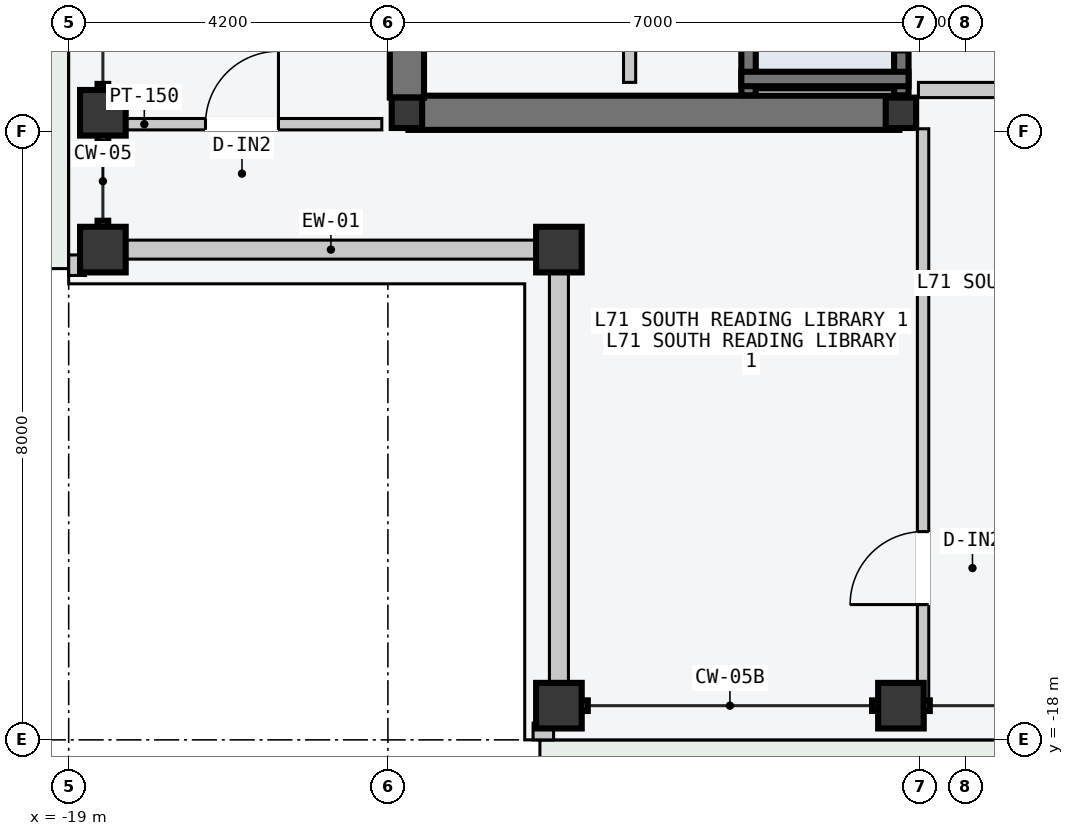
"""IFC4 building model, lengths in metres.
Left out: names, types, materials, properties, quantities, classifications, styles, units other than length and angle.
Written with IfcOpenShell. Run it as: python <this file> out.ifc"""

import sys

from ifc_helpers import new_model, si_unit, direction, frame, frame_2d, origin, origin_2d, place, context, subcontext, project, spatial, rectangle, hollow_rectangle, i_section, extrude, element, fill, save


model = new_model("IFC4")
c1 = context("Model", 3, precision=1e-05, world=origin(), true_north=direction((0.0, 1.0)))
c2 = subcontext(c1, "Body", "Model", "MODEL_VIEW")
j1 = project(units=[si_unit("LENGTHUNIT", "METRE"), si_unit("PLANEANGLEUNIT", "RADIAN")], contexts=[c1])
p1 = place(None, origin())
s1 = spatial("IfcSite", under=j1, at=p1, CompositionType="ELEMENT")
p2 = place(p1, origin())
s2 = spatial("IfcBuilding", under=s1, at=p2, CompositionType="ELEMENT")
p3 = place(p2, frame((0.0, 0.0, 268.8)))
s3 = spatial("IfcBuildingStorey", under=s2, at=p3, CompositionType="ELEMENT", Elevation=268.8)
p4 = place(p3, frame((-14.53, -9.75, -0.2), z_axis=(0.0, 0.0, 1.0), x_axis=(1.0, 0.0, 0.0)))
e1 = element("IfcWall", 1, at=p4, inside=s3, PredefinedType="SHEAR", context=c2, shape_type="SweptSolid", body=[
    extrude(rectangle(XDim=6.46, YDim=0.45, at=frame_2d((3.23, 0.0))), origin(), (0.0, 0.0, 1.0), 3.6),
])
p5 = place(p3, frame((-14.55, -9.55, -0.2), z_axis=(0.0, 0.0, 1.0), x_axis=(0.0, 1.0, 0.0)))
e2 = element("IfcWall", 2, at=p5, inside=s3, PredefinedType="SHEAR", context=c2, shape_type="SweptSolid", body=[
    extrude(rectangle(XDim=9.35, YDim=0.45, at=frame_2d((4.675, 0.0))), origin(), (0.0, 0.0, 1.0), 3.6),
])
for number, where, z_axis, x_axis in (
    (3, (-14.55, -9.75, 0.0), (0.0, 0.0, 1.0), (1.0, 0.0, 0.0)),
    (4, (-8.05, -9.75, 0.0), (0.0, 0.0, 1.0), (1.0, 0.0, 0.0)),
):
    element("IfcColumn", number, at=place(p3, frame(where, z_axis=z_axis, x_axis=x_axis)), inside=s3, PredefinedType="COLUMN", context=c2, shape_type="SweptSolid", body=[
        extrude(i_section(OverallWidth=0.4, OverallDepth=0.4, WebThickness=0.013, FlangeThickness=0.021, at=origin_2d()), origin(), (0.0, 0.0, 1.0), 3.6),
    ])
for number, where, z_axis, x_axis in (
    (5, (-12.55, -17.55, 0.0), (0.0, 0.0, 1.0), (1.0, 0.0, 0.0)),
    (6, (-8.05, -17.55, 0.0), (0.0, 0.0, 1.0), (1.0, 0.0, 0.0)),
    (7, (-18.55, -11.55, 0.0), (0.0, 0.0, 1.0), (0.0, 1.0, 0.0)),
    (8, (-18.55, -9.75, 0.0), (0.0, 0.0, 1.0), (0.0, 1.0, 0.0)),
    (9, (-12.55, -11.55, 0.0), (0.0, 0.0, 1.0), (1.0, 0.0, 0.0)),
):
    element("IfcColumn", number, at=place(p3, frame(where, z_axis=z_axis, x_axis=x_axis)), inside=s3, PredefinedType="COLUMN", context=c2, shape_type="SweptSolid", body=[
        extrude(hollow_rectangle(XDim=0.6, YDim=0.6, WallThickness=0.025, at=origin_2d()), origin(), (0.0, 0.0, 1.0), 3.6),
    ])
for number, where, z_axis, x_axis in (
    (10, (-18.24, -11.55, 0.0), (0.0, 0.0, 1.0), (1.0, 0.0, 0.0)),
    (11, (-12.55, -17.24, 0.0), (0.0, 0.0, 1.0), (0.0, 1.0, 0.0)),
):
    element("IfcWall", number, at=place(p3, frame(where, z_axis=z_axis, x_axis=x_axis)), inside=s3, PredefinedType="STANDARD", context=c2, shape_type="SweptSolid", body=[
        extrude(rectangle(XDim=5.38, YDim=0.25, at=frame_2d((2.69, 0.0))), origin(), (0.0, 0.0, 1.0), 2.85),
    ])
for number, where, z_axis, x_axis in (
    (12, (-12.89, -17.89, 0.0), (0.0, 0.0, 1.0), (1.0, 0.0, 0.0)),
    (13, (-18.89, -11.89, 0.0), (0.0, 0.0, 1.0), (0.0, 1.0, 0.0)),
):
    element("IfcWall", number, at=place(p3, frame(where, z_axis=z_axis, x_axis=x_axis)), inside=s3, PredefinedType="PARAPET", context=c2, shape_type="SweptSolid", body=[
        extrude(rectangle(XDim=0.27, YDim=0.22, at=frame_2d((0.135, 0.0))), origin(), (0.0, 0.0, 1.0), 1.2),
    ])
p6 = place(p3, frame((-8.045, -9.52, -0.2), z_axis=(0.0, 0.0, 1.0), x_axis=(0.0, 1.0, 0.0)))
e14 = element("IfcWall", 14, at=p6, inside=s3, PredefinedType="SOLIDWALL", context=c2, shape_type="SweptSolid", body=[
    extrude(rectangle(XDim=2.12, YDim=0.19, at=frame_2d((1.06, 0.0))), origin(), (0.0, 0.0, 1.0), 3.6),
])
p7 = place(p6, frame((0.57, 0.0, 0.2)))
e15 = element("IfcOpeningElement", 15, at=p7, cuts=e14, PredefinedType="OPENING", context=c2, shape_type="SweptSolid", body=[
    extrude(rectangle(XDim=1.1, YDim=2.2, at=frame_2d((0.55, 1.1))), frame((0.0, 0.105, 0.0), z_axis=(0.0, -1.0, 0.0), x_axis=(1.0, 0.0, 0.0)), (0.0, 0.0, 1.0), 0.21),
])
p8 = place(p3, frame((-10.055, -9.52, -0.2), z_axis=(0.0, 0.0, 1.0), x_axis=(0.0, 1.0, 0.0)))
e16 = element("IfcWall", 16, at=p8, inside=s3, PredefinedType="SOLIDWALL", context=c2, shape_type="SweptSolid", body=[
    extrude(rectangle(XDim=2.12, YDim=0.19, at=frame_2d((1.06, 0.0))), origin(), (0.0, 0.0, 1.0), 3.6),
])
p9 = place(p3, frame((-10.15, -9.305, -0.2), z_axis=(0.0, 0.0, 1.0), x_axis=(1.0, 0.0, 0.0)))
e17 = element("IfcWall", 17, at=p9, inside=s3, PredefinedType="SOLIDWALL", context=c2, shape_type="SweptSolid", body=[
    extrude(rectangle(XDim=2.2, YDim=0.19, at=frame_2d((1.1, 0.0))), origin(), (0.0, 0.0, 1.0), 3.6),
])
p10 = place(p3, frame((-6.02, -9.45, 0.0), z_axis=(0.0, 0.0, 1.0), x_axis=(-1.0, 0.0, 0.0)))
e18 = element("IfcWall", 18, at=p10, inside=s3, PredefinedType="PARTITIONING", context=c2, shape_type="SweptSolid", body=[
    extrude(rectangle(XDim=1.8, YDim=0.2, at=frame_2d((0.9, 0.0))), origin(), (0.0, 0.0, 1.0), 3.4),
])
p11 = place(p3, frame((-11.62, -9.35, 0.0), z_axis=(0.0, 0.0, 1.0), x_axis=(0.0, 1.0, 0.0)))
e19 = element("IfcWall", 19, at=p11, inside=s3, PredefinedType="PARTITIONING", context=c2, shape_type="SweptSolid", body=[
    extrude(rectangle(XDim=3.85, YDim=0.16, at=frame_2d((1.925, 0.0))), origin(), (0.0, 0.0, 1.0), 3.4),
])
p12 = place(p11, frame((1.475, 0.0, 0.0)))
e20 = element("IfcOpeningElement", 20, at=p12, cuts=e19, PredefinedType="OPENING", context=c2, shape_type="SweptSolid", body=[
    extrude(rectangle(XDim=0.9, YDim=2.15, at=frame_2d((0.45, 1.075))), frame((0.0, 0.09, 0.0), z_axis=(0.0, -1.0, 0.0), x_axis=(1.0, 0.0, 0.0)), (0.0, 0.0, 1.0), 0.18),
])
p13 = place(p3, frame((-7.759, -17.56, 0.0), z_axis=(0.0, 0.0, 1.0), x_axis=(0.0, 1.0, 0.0)))
e21 = element("IfcWall", 21, at=p13, inside=s3, PredefinedType="PARTITIONING", context=c2, shape_type="SweptSolid", body=[
    extrude(rectangle(XDim=7.6, YDim=0.15, at=frame_2d((3.8, 0.0))), origin(), (0.0, 0.0, 1.0), 3.4),
])
p14 = place(p13, frame((1.34, 0.0, 0.0)))
e22 = element("IfcOpeningElement", 22, at=p14, cuts=e21, PredefinedType="OPENING", context=c2, shape_type="SweptSolid", body=[
    extrude(rectangle(XDim=0.96, YDim=2.18, at=frame_2d((0.48, 1.09))), frame((0.0, 0.085, 0.0), z_axis=(0.0, -1.0, 0.0), x_axis=(1.0, 0.0, 0.0)), (0.0, 0.0, 1.0), 0.17),
])
p15 = place(p3, frame((-18.56, -9.9, 0.0), z_axis=(0.0, 0.0, 1.0), x_axis=(1.0, 0.0, 0.0)))
e23 = element("IfcWall", 23, at=p15, inside=s3, PredefinedType="PARTITIONING", context=c2, shape_type="SweptSolid", body=[
    extrude(rectangle(XDim=3.68, YDim=0.15, at=frame_2d((1.84, 0.0))), origin(), (0.0, 0.0, 1.0), 3.4),
])
p16 = place(p15, frame((1.36, 0.0, 0.0)))
e24 = element("IfcOpeningElement", 24, at=p16, cuts=e23, PredefinedType="OPENING", context=c2, shape_type="SweptSolid", body=[
    extrude(rectangle(XDim=0.96, YDim=2.18, at=frame_2d((0.48, 1.09))), frame((0.0, 0.085, 0.0), z_axis=(0.0, -1.0, 0.0), x_axis=(1.0, 0.0, 0.0)), (0.0, 0.0, 1.0), 0.17),
])
p17 = place(p14, origin())
e25 = element("IfcDoor", 25, at=p17, inside=s3, OperationType="SINGLE_SWING_LEFT", PredefinedType="DOOR", context=c2, shape_type="SweptSolid", body=[
    extrude(rectangle(XDim=0.96, YDim=2.18, at=frame_2d((0.48, 1.09))), frame((0.0, 0.025, 0.0), z_axis=(0.0, -1.0, 0.0), x_axis=(1.0, 0.0, 0.0)), (0.0, 0.0, 1.0), 0.05),
])
fill(e22, e25)
p18 = place(p16, origin())
e26 = element("IfcDoor", 26, at=p18, inside=s3, OperationType="SINGLE_SWING_RIGHT", PredefinedType="DOOR", context=c2, shape_type="SweptSolid", body=[
    extrude(rectangle(XDim=0.96, YDim=2.18, at=frame_2d((0.48, 1.09))), frame((0.0, 0.025, 0.0), z_axis=(0.0, -1.0, 0.0), x_axis=(1.0, 0.0, 0.0)), (0.0, 0.0, 1.0), 0.05),
])
fill(e24, e26)
save(model, sys.argv[1])
